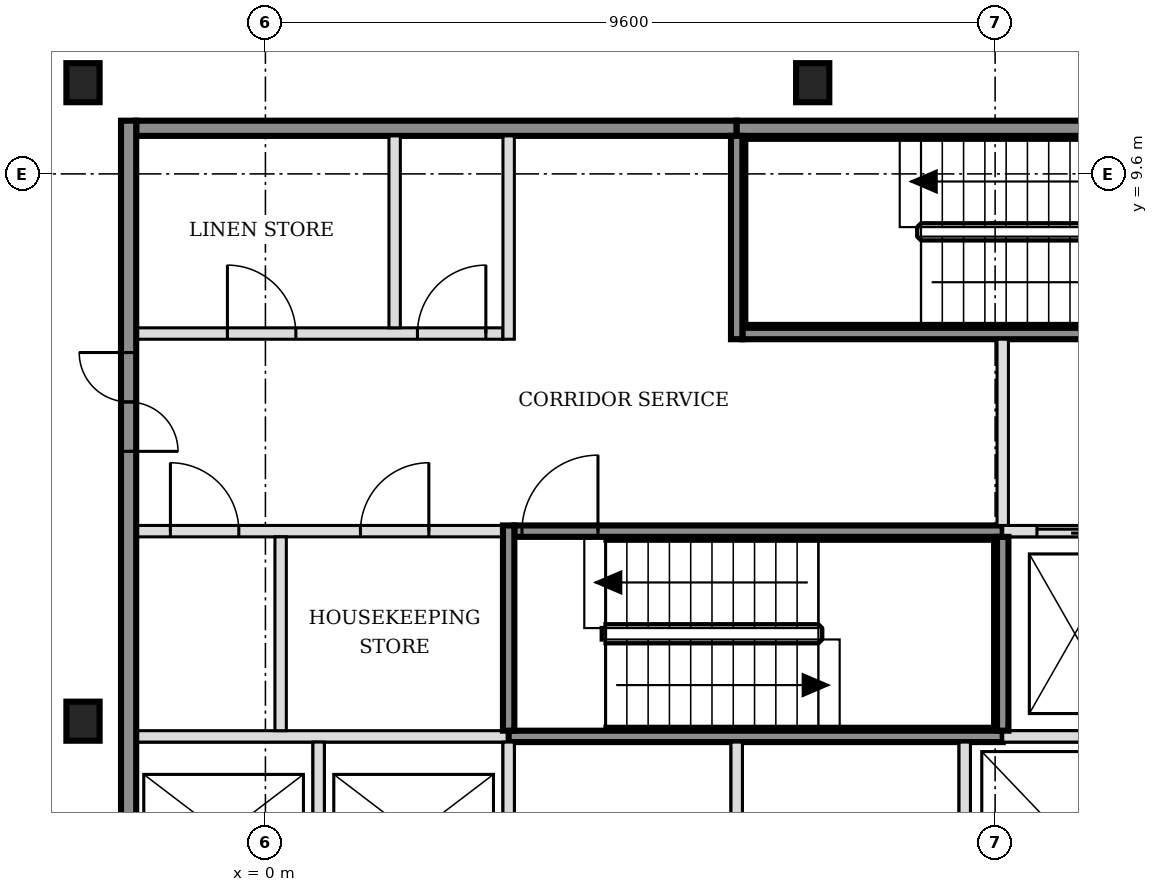
"""IFC4 building model, lengths in metres.
Left out: names, types, materials, properties, quantities, classifications, styles, units other than length and angle.
Written with IfcOpenShell. Run it as: python <this file> out.ifc"""

import sys

from ifc_helpers import new_model, si_unit, direction, frame, frame_2d, origin, origin_2d, place, context, subcontext, project, spatial, rectangle, i_section, extrude, element, fill, save


model = new_model("IFC4")
c1 = context("Model", 3, precision=1e-05, world=origin(), true_north=direction((0.0, 1.0)))
c2 = subcontext(c1, "Body", "Model", "MODEL_VIEW")
j1 = project(units=[si_unit("LENGTHUNIT", "METRE"), si_unit("PLANEANGLEUNIT", "RADIAN")], contexts=[c1])
p1 = place(None, origin())
s1 = spatial("IfcSite", under=j1, at=p1, CompositionType="ELEMENT")
p2 = place(p1, origin())
s2 = spatial("IfcBuilding", under=s1, at=p2, CompositionType="ELEMENT")
p3 = place(p2, frame((0.0, 0.0, 69.0)))
s3 = spatial("IfcBuildingStorey", under=s2, at=p3, CompositionType="ELEMENT", Elevation=69.0)
for number, where, z_axis, x_axis in (
    (1, (-2.4, 2.4, -0.15), (0.0, 0.0, 1.0), (1.0, 0.0, 0.0)),
    (2, (-2.4, 10.8, -0.15), (0.0, 0.0, 1.0), (1.0, 0.0, 0.0)),
    (3, (7.2, 10.8, -0.15), (0.0, 0.0, 1.0), (1.0, 0.0, 0.0)),
):
    element("IfcColumn", number, at=place(p3, frame(where, z_axis=z_axis, x_axis=x_axis)), inside=s3, PredefinedType="COLUMN", context=c2, shape_type="SweptSolid", body=[
        extrude(i_section(OverallWidth=0.437, OverallDepth=0.514, WebThickness=0.061, FlangeThickness=0.097, FilletRadius=0.015, at=origin_2d()), origin(), (0.0, 0.0, 1.0), 3.6),
    ])
p4 = place(p3, frame((-1.7, 2.2, 0.0), z_axis=(0.0, 0.0, 1.0), x_axis=(1.0, 0.0, 0.0)))
e4 = element("IfcWall", 4, at=p4, inside=s3, PredefinedType="SOLIDWALL", context=c2, shape_type="SweptSolid", body=[
    extrude(rectangle(XDim=4.9, YDim=0.15, at=frame_2d((2.45, 0.0))), origin(), (0.0, 0.0, 1.0), 3.45),
])
p5 = place(p3, frame((3.2, 2.2, 0.0), z_axis=(0.0, 0.0, 1.0), x_axis=(1.0, 0.0, 0.0)))
e5 = element("IfcWall", 5, at=p5, inside=s3, PredefinedType="SOLIDWALL", context=c2, shape_type="SweptSolid", body=[
    extrude(rectangle(XDim=6.5, YDim=0.15, at=frame_2d((3.25, 0.0))), origin(), (0.0, 0.0, 1.0), 3.45),
])
p6 = place(p3, frame((9.7, 2.2, 0.0), z_axis=(0.0, 0.0, 1.0), x_axis=(1.0, 0.0, 0.0)))
e6 = element("IfcWall", 6, at=p6, inside=s3, PredefinedType="SOLIDWALL", context=c2, shape_type="SweptSolid", body=[
    extrude(rectangle(XDim=4.525, YDim=0.15, at=frame_2d((2.263, 0.0))), origin(), (0.0, 0.0, 1.0), 3.45),
])
p7 = place(p3, frame((-1.7, 4.9, 0.0), z_axis=(0.0, 0.0, 1.0), x_axis=(1.0, 0.0, 0.0)))
e7 = element("IfcWall", 7, at=p7, inside=s3, PredefinedType="PARTITIONING", context=c2, shape_type="SweptSolid", body=[
    extrude(rectangle(XDim=4.825, YDim=0.15, at=frame_2d((2.413, 0.0))), origin(), (0.0, 0.0, 1.0), 3.45),
])
p8 = place(p7, frame((0.45, 0.0, 0.0)))
e8 = element("IfcOpeningElement", 8, at=p8, cuts=e7, PredefinedType="OPENING", context=c2, shape_type="SweptSolid", body=[
    extrude(rectangle(XDim=0.9, YDim=2.1, at=frame_2d((0.45, 1.05))), frame((0.0, 0.085, 0.0), z_axis=(0.0, -1.0, 0.0), x_axis=(1.0, 0.0, 0.0)), (0.0, 0.0, 1.0), 0.17),
])
p9 = place(p7, frame((2.95, 0.0, 0.0)))
e9 = element("IfcOpeningElement", 9, at=p9, cuts=e7, PredefinedType="OPENING", context=c2, shape_type="SweptSolid", body=[
    extrude(rectangle(XDim=0.9, YDim=2.1, at=frame_2d((0.45, 1.05))), frame((0.0, 0.085, 0.0), z_axis=(0.0, -1.0, 0.0), x_axis=(1.0, 0.0, 0.0)), (0.0, 0.0, 1.0), 0.17),
])
p10 = place(p3, frame((3.275, 4.9, 0.0), z_axis=(0.0, 0.0, 1.0), x_axis=(1.0, 0.0, 0.0)))
e10 = element("IfcWall", 10, at=p10, inside=s3, PredefinedType="SOLIDWALL", context=c2, shape_type="SweptSolid", body=[
    extrude(rectangle(XDim=6.425, YDim=0.15, at=frame_2d((3.212, 0.0))), origin(), (0.0, 0.0, 1.0), 3.45),
])
p11 = place(p10, frame((0.1, 0.0, 0.0)))
e11 = element("IfcOpeningElement", 11, at=p11, cuts=e10, PredefinedType="OPENING", context=c2, shape_type="SweptSolid", body=[
    extrude(rectangle(XDim=1.0, YDim=2.1, at=frame_2d((0.5, 1.05))), frame((0.0, 0.085, 0.0), z_axis=(0.0, -1.0, 0.0), x_axis=(1.0, 0.0, 0.0)), (0.0, 0.0, 1.0), 0.17),
])
p12 = place(p3, frame((9.7, 4.9, 0.0), z_axis=(0.0, 0.0, 1.0), x_axis=(1.0, 0.0, 0.0)))
e12 = element("IfcWall", 12, at=p12, inside=s3, PredefinedType="SOLIDWALL", context=c2, shape_type="SweptSolid", body=[
    extrude(rectangle(XDim=6.4, YDim=0.15, at=frame_2d((3.2, 0.0))), origin(), (0.0, 0.0, 1.0), 3.45),
])
p13 = place(p12, frame((0.45, 0.0, 0.0)))
e13 = element("IfcOpeningElement", 13, at=p13, cuts=e12, PredefinedType="OPENING", context=c2, shape_type="SweptSolid", body=[
    extrude(rectangle(XDim=1.0, YDim=2.1, at=frame_2d((0.5, 1.05))), frame((0.0, 0.085, 0.0), z_axis=(0.0, -1.0, 0.0), x_axis=(1.0, 0.0, 0.0)), (0.0, 0.0, 1.0), 0.17),
])
p14 = place(p12, frame((2.35, 0.0, 0.0)))
e14 = element("IfcOpeningElement", 14, at=p14, cuts=e12, PredefinedType="OPENING", context=c2, shape_type="SweptSolid", body=[
    extrude(rectangle(XDim=1.0, YDim=2.1, at=frame_2d((0.5, 1.05))), frame((0.0, 0.085, 0.0), z_axis=(0.0, -1.0, 0.0), x_axis=(1.0, 0.0, 0.0)), (0.0, 0.0, 1.0), 0.17),
])
p15 = place(p12, frame((4.7, 0.0, 0.0)))
e15 = element("IfcOpeningElement", 15, at=p15, cuts=e12, PredefinedType="OPENING", context=c2, shape_type="SweptSolid", body=[
    extrude(rectangle(XDim=0.9, YDim=2.1, at=frame_2d((0.45, 1.05))), frame((0.0, 0.085, 0.0), z_axis=(0.0, -1.0, 0.0), x_axis=(1.0, 0.0, 0.0)), (0.0, 0.0, 1.0), 0.17),
])
p16 = place(p3, frame((-1.7, 7.5, 0.0), z_axis=(0.0, 0.0, 1.0), x_axis=(1.0, 0.0, 0.0)))
e16 = element("IfcWall", 16, at=p16, inside=s3, PredefinedType="PARTITIONING", context=c2, shape_type="SweptSolid", body=[
    extrude(rectangle(XDim=4.825, YDim=0.15, at=frame_2d((2.413, 0.0))), origin(), (0.0, 0.0, 1.0), 3.45),
])
p17 = place(p16, frame((1.2, 0.0, 0.0)))
e17 = element("IfcOpeningElement", 17, at=p17, cuts=e16, PredefinedType="OPENING", context=c2, shape_type="SweptSolid", body=[
    extrude(rectangle(XDim=0.9, YDim=2.1, at=frame_2d((0.45, 1.05))), frame((0.0, 0.085, 0.0), z_axis=(0.0, -1.0, 0.0), x_axis=(1.0, 0.0, 0.0)), (0.0, 0.0, 1.0), 0.17),
])
p18 = place(p16, frame((3.7, 0.0, 0.0)))
e18 = element("IfcOpeningElement", 18, at=p18, cuts=e16, PredefinedType="OPENING", context=c2, shape_type="SweptSolid", body=[
    extrude(rectangle(XDim=0.9, YDim=2.1, at=frame_2d((0.45, 1.05))), frame((0.0, 0.085, 0.0), z_axis=(0.0, -1.0, 0.0), x_axis=(1.0, 0.0, 0.0)), (0.0, 0.0, 1.0), 0.17),
])
p19 = place(p3, frame((6.275, 7.5, 0.0), z_axis=(0.0, 0.0, 1.0), x_axis=(1.0, 0.0, 0.0)))
e19 = element("IfcWall", 19, at=p19, inside=s3, PredefinedType="SOLIDWALL", context=c2, shape_type="SweptSolid", body=[
    extrude(rectangle(XDim=6.425, YDim=0.15, at=frame_2d((3.212, 0.0))), origin(), (0.0, 0.0, 1.0), 3.45),
])
p20 = place(p19, frame((5.225, 0.0, 0.0)))
e20 = element("IfcOpeningElement", 20, at=p20, cuts=e19, PredefinedType="OPENING", context=c2, shape_type="SweptSolid", body=[
    extrude(rectangle(XDim=1.0, YDim=2.1, at=frame_2d((0.5, 1.05))), frame((0.0, 0.085, 0.0), z_axis=(0.0, -1.0, 0.0), x_axis=(1.0, 0.0, 0.0)), (0.0, 0.0, 1.0), 0.17),
])
p21 = place(p3, frame((-1.7, 10.2, 0.0), z_axis=(0.0, 0.0, 1.0), x_axis=(1.0, 0.0, 0.0)))
e21 = element("IfcWall", 21, at=p21, inside=s3, PredefinedType="SOLIDWALL", context=c2, shape_type="SweptSolid", body=[
    extrude(rectangle(XDim=7.9, YDim=0.2, at=frame_2d((3.95, 0.0))), origin(), (0.0, 0.0, 1.0), 3.45),
])
p22 = place(p3, frame((6.2, 10.2, 0.0), z_axis=(0.0, 0.0, 1.0), x_axis=(1.0, 0.0, 0.0)))
e22 = element("IfcWall", 22, at=p22, inside=s3, PredefinedType="SOLIDWALL", context=c2, shape_type="SweptSolid", body=[
    extrude(rectangle(XDim=6.5, YDim=0.2, at=frame_2d((3.25, 0.0))), origin(), (0.0, 0.0, 1.0), 3.45),
])
p23 = place(p3, frame((-1.8, -5.5, 0.0), z_axis=(0.0, 0.0, 1.0), x_axis=(0.0, 1.0, 0.0)))
e23 = element("IfcWall", 23, at=p23, inside=s3, PredefinedType="SOLIDWALL", context=c2, shape_type="SweptSolid", body=[
    extrude(rectangle(XDim=15.8, YDim=0.2, at=frame_2d((7.9, 0.0))), origin(), (0.0, 0.0, 1.0), 3.45),
])
p24 = place(p23, frame((3.05, 0.0, 0.0)))
e24 = element("IfcOpeningElement", 24, at=p24, cuts=e23, PredefinedType="OPENING", context=c2, shape_type="SweptSolid", body=[
    extrude(rectangle(XDim=1.3, YDim=2.1, at=frame_2d((0.65, 1.05))), frame((0.0, 0.11, 0.0), z_axis=(0.0, -1.0, 0.0), x_axis=(1.0, 0.0, 0.0)), (0.0, 0.0, 1.0), 0.22),
])
p25 = place(p23, frame((11.45, 0.0, 0.0)))
e25 = element("IfcOpeningElement", 25, at=p25, cuts=e23, PredefinedType="OPENING", context=c2, shape_type="SweptSolid", body=[
    extrude(rectangle(XDim=1.3, YDim=2.1, at=frame_2d((0.65, 1.05))), frame((0.0, 0.11, 0.0), z_axis=(0.0, -1.0, 0.0), x_axis=(1.0, 0.0, 0.0)), (0.0, 0.0, 1.0), 0.22),
])
p26 = place(p3, frame((0.2, 2.275, 0.0), z_axis=(0.0, 0.0, 1.0), x_axis=(0.0, 1.0, 0.0)))
e26 = element("IfcWall", 26, at=p26, inside=s3, PredefinedType="PARTITIONING", context=c2, shape_type="SweptSolid", body=[
    extrude(rectangle(XDim=2.55, YDim=0.15, at=frame_2d((1.275, 0.0))), origin(), (0.0, 0.0, 1.0), 3.45),
])
p27 = place(p3, frame((0.7, -0.325, 0.0), z_axis=(0.0, 0.0, 1.0), x_axis=(0.0, 1.0, 0.0)))
e27 = element("IfcWall", 27, at=p27, inside=s3, PredefinedType="SOLIDWALL", context=c2, shape_type="SweptSolid", body=[
    extrude(rectangle(XDim=2.45, YDim=0.15, at=frame_2d((1.225, 0.0))), origin(), (0.0, 0.0, 1.0), 3.45),
])
p28 = place(p3, frame((1.7, 7.575, 0.0), z_axis=(0.0, 0.0, 1.0), x_axis=(0.0, 1.0, 0.0)))
e28 = element("IfcWall", 28, at=p28, inside=s3, PredefinedType="PARTITIONING", context=c2, shape_type="SweptSolid", body=[
    extrude(rectangle(XDim=2.525, YDim=0.15, at=frame_2d((1.263, 0.0))), origin(), (0.0, 0.0, 1.0), 3.45),
])
p29 = place(p3, frame((3.2, -0.325, 0.0), z_axis=(0.0, 0.0, 1.0), x_axis=(0.0, 1.0, 0.0)))
e29 = element("IfcWall", 29, at=p29, inside=s3, PredefinedType="SOLIDWALL", context=c2, shape_type="SweptSolid", body=[
    extrude(rectangle(XDim=2.45, YDim=0.15, at=frame_2d((1.225, 0.0))), origin(), (0.0, 0.0, 1.0), 3.45),
])
p30 = place(p3, frame((3.2, 2.275, 0.0), z_axis=(0.0, 0.0, 1.0), x_axis=(0.0, 1.0, 0.0)))
e30 = element("IfcWall", 30, at=p30, inside=s3, PredefinedType="SOLIDWALL", context=c2, shape_type="SweptSolid", body=[
    extrude(rectangle(XDim=2.7, YDim=0.15, at=frame_2d((1.35, 0.0))), origin(), (0.0, 0.0, 1.0), 3.45),
])
p31 = place(p3, frame((3.2, 7.425, 0.0), z_axis=(0.0, 0.0, 1.0), x_axis=(0.0, 1.0, 0.0)))
e31 = element("IfcWall", 31, at=p31, inside=s3, PredefinedType="PARTITIONING", context=c2, shape_type="SweptSolid", body=[
    extrude(rectangle(XDim=2.675, YDim=0.15, at=frame_2d((1.337, 0.0))), origin(), (0.0, 0.0, 1.0), 3.45),
])
p32 = place(p3, frame((6.2, -0.325, 0.0), z_axis=(0.0, 0.0, 1.0), x_axis=(0.0, 1.0, 0.0)))
e32 = element("IfcWall", 32, at=p32, inside=s3, PredefinedType="SOLIDWALL", context=c2, shape_type="SweptSolid", body=[
    extrude(rectangle(XDim=2.45, YDim=0.15, at=frame_2d((1.225, 0.0))), origin(), (0.0, 0.0, 1.0), 3.45),
])
p33 = place(p3, frame((6.2, 7.425, 0.0), z_axis=(0.0, 0.0, 1.0), x_axis=(0.0, 1.0, 0.0)))
e33 = element("IfcWall", 33, at=p33, inside=s3, PredefinedType="SOLIDWALL", context=c2, shape_type="SweptSolid", body=[
    extrude(rectangle(XDim=2.675, YDim=0.15, at=frame_2d((1.337, 0.0))), origin(), (0.0, 0.0, 1.0), 3.45),
])
p34 = place(p3, frame((9.2, -0.325, 0.0), z_axis=(0.0, 0.0, 1.0), x_axis=(0.0, 1.0, 0.0)))
e34 = element("IfcWall", 34, at=p34, inside=s3, PredefinedType="SOLIDWALL", context=c2, shape_type="SweptSolid", body=[
    extrude(rectangle(XDim=2.45, YDim=0.15, at=frame_2d((1.225, 0.0))), origin(), (0.0, 0.0, 1.0), 3.45),
])
p35 = place(p3, frame((9.7, 2.275, 0.0), z_axis=(0.0, 0.0, 1.0), x_axis=(0.0, 1.0, 0.0)))
e35 = element("IfcWall", 35, at=p35, inside=s3, PredefinedType="SOLIDWALL", context=c2, shape_type="SweptSolid", body=[
    extrude(rectangle(XDim=2.55, YDim=0.15, at=frame_2d((1.275, 0.0))), origin(), (0.0, 0.0, 1.0), 3.45),
])
p36 = place(p3, frame((9.7, 4.975, 0.0), z_axis=(0.0, 0.0, 1.0), x_axis=(0.0, 1.0, 0.0)))
e36 = element("IfcWall", 36, at=p36, inside=s3, PredefinedType="SOLIDWALL", context=c2, shape_type="SweptSolid", body=[
    extrude(rectangle(XDim=2.45, YDim=0.15, at=frame_2d((1.225, 0.0))), origin(), (0.0, 0.0, 1.0), 3.45),
])
p37 = place(p13, origin())
e37 = element("IfcDoor", 37, at=p37, inside=s3, OperationType="DOUBLE_DOOR_SLIDING", PredefinedType="DOOR", context=c2, shape_type="SweptSolid", body=[
    extrude(rectangle(XDim=1.0, YDim=2.1, at=frame_2d((0.5, 1.05))), frame((0.0, 0.025, 0.0), z_axis=(0.0, -1.0, 0.0), x_axis=(1.0, 0.0, 0.0)), (0.0, 0.0, 1.0), 0.05),
])
fill(e13, e37)
p38 = place(p11, origin())
e38 = element("IfcDoor", 38, at=p38, inside=s3, OperationType="SINGLE_SWING_RIGHT", PredefinedType="DOOR", context=c2, shape_type="SweptSolid", body=[
    extrude(rectangle(XDim=1.0, YDim=2.1, at=frame_2d((0.5, 1.05))), frame((0.0, 0.025, 0.0), z_axis=(0.0, -1.0, 0.0), x_axis=(1.0, 0.0, 0.0)), (0.0, 0.0, 1.0), 0.05),
])
fill(e11, e38)
p39 = place(p25, origin())
e39 = element("IfcDoor", 39, at=p39, inside=s3, OperationType="DOUBLE_DOOR_SINGLE_SWING", PredefinedType="DOOR", context=c2, shape_type="SweptSolid", body=[
    extrude(rectangle(XDim=1.3, YDim=2.1, at=frame_2d((0.65, 1.05))), frame((0.0, 0.025, 0.0), z_axis=(0.0, -1.0, 0.0), x_axis=(1.0, 0.0, 0.0)), (0.0, 0.0, 1.0), 0.05),
])
fill(e25, e39)
p40 = place(p8, origin())
e40 = element("IfcDoor", 40, at=p40, inside=s3, OperationType="SINGLE_SWING_LEFT", PredefinedType="DOOR", context=c2, shape_type="SweptSolid", body=[
    extrude(rectangle(XDim=0.9, YDim=2.1, at=frame_2d((0.45, 1.05))), frame((0.0, 0.025, 0.0), z_axis=(0.0, -1.0, 0.0), x_axis=(1.0, 0.0, 0.0)), (0.0, 0.0, 1.0), 0.05),
])
fill(e8, e40)
p41 = place(p9, origin())
e41 = element("IfcDoor", 41, at=p41, inside=s3, OperationType="SINGLE_SWING_RIGHT", PredefinedType="DOOR", context=c2, shape_type="SweptSolid", body=[
    extrude(rectangle(XDim=0.9, YDim=2.1, at=frame_2d((0.45, 1.05))), frame((0.0, 0.025, 0.0), z_axis=(0.0, -1.0, 0.0), x_axis=(1.0, 0.0, 0.0)), (0.0, 0.0, 1.0), 0.05),
])
fill(e9, e41)
p42 = place(p17, origin())
e42 = element("IfcDoor", 42, at=p42, inside=s3, OperationType="SINGLE_SWING_LEFT", PredefinedType="DOOR", context=c2, shape_type="SweptSolid", body=[
    extrude(rectangle(XDim=0.9, YDim=2.1, at=frame_2d((0.45, 1.05))), frame((0.0, 0.025, 0.0), z_axis=(0.0, -1.0, 0.0), x_axis=(1.0, 0.0, 0.0)), (0.0, 0.0, 1.0), 0.05),
])
fill(e17, e42)
p43 = place(p18, origin())
e43 = element("IfcDoor", 43, at=p43, inside=s3, OperationType="SINGLE_SWING_RIGHT", PredefinedType="DOOR", context=c2, shape_type="SweptSolid", body=[
    extrude(rectangle(XDim=0.9, YDim=2.1, at=frame_2d((0.45, 1.05))), frame((0.0, 0.025, 0.0), z_axis=(0.0, -1.0, 0.0), x_axis=(1.0, 0.0, 0.0)), (0.0, 0.0, 1.0), 0.05),
])
fill(e18, e43)
save(model, sys.argv[1])
